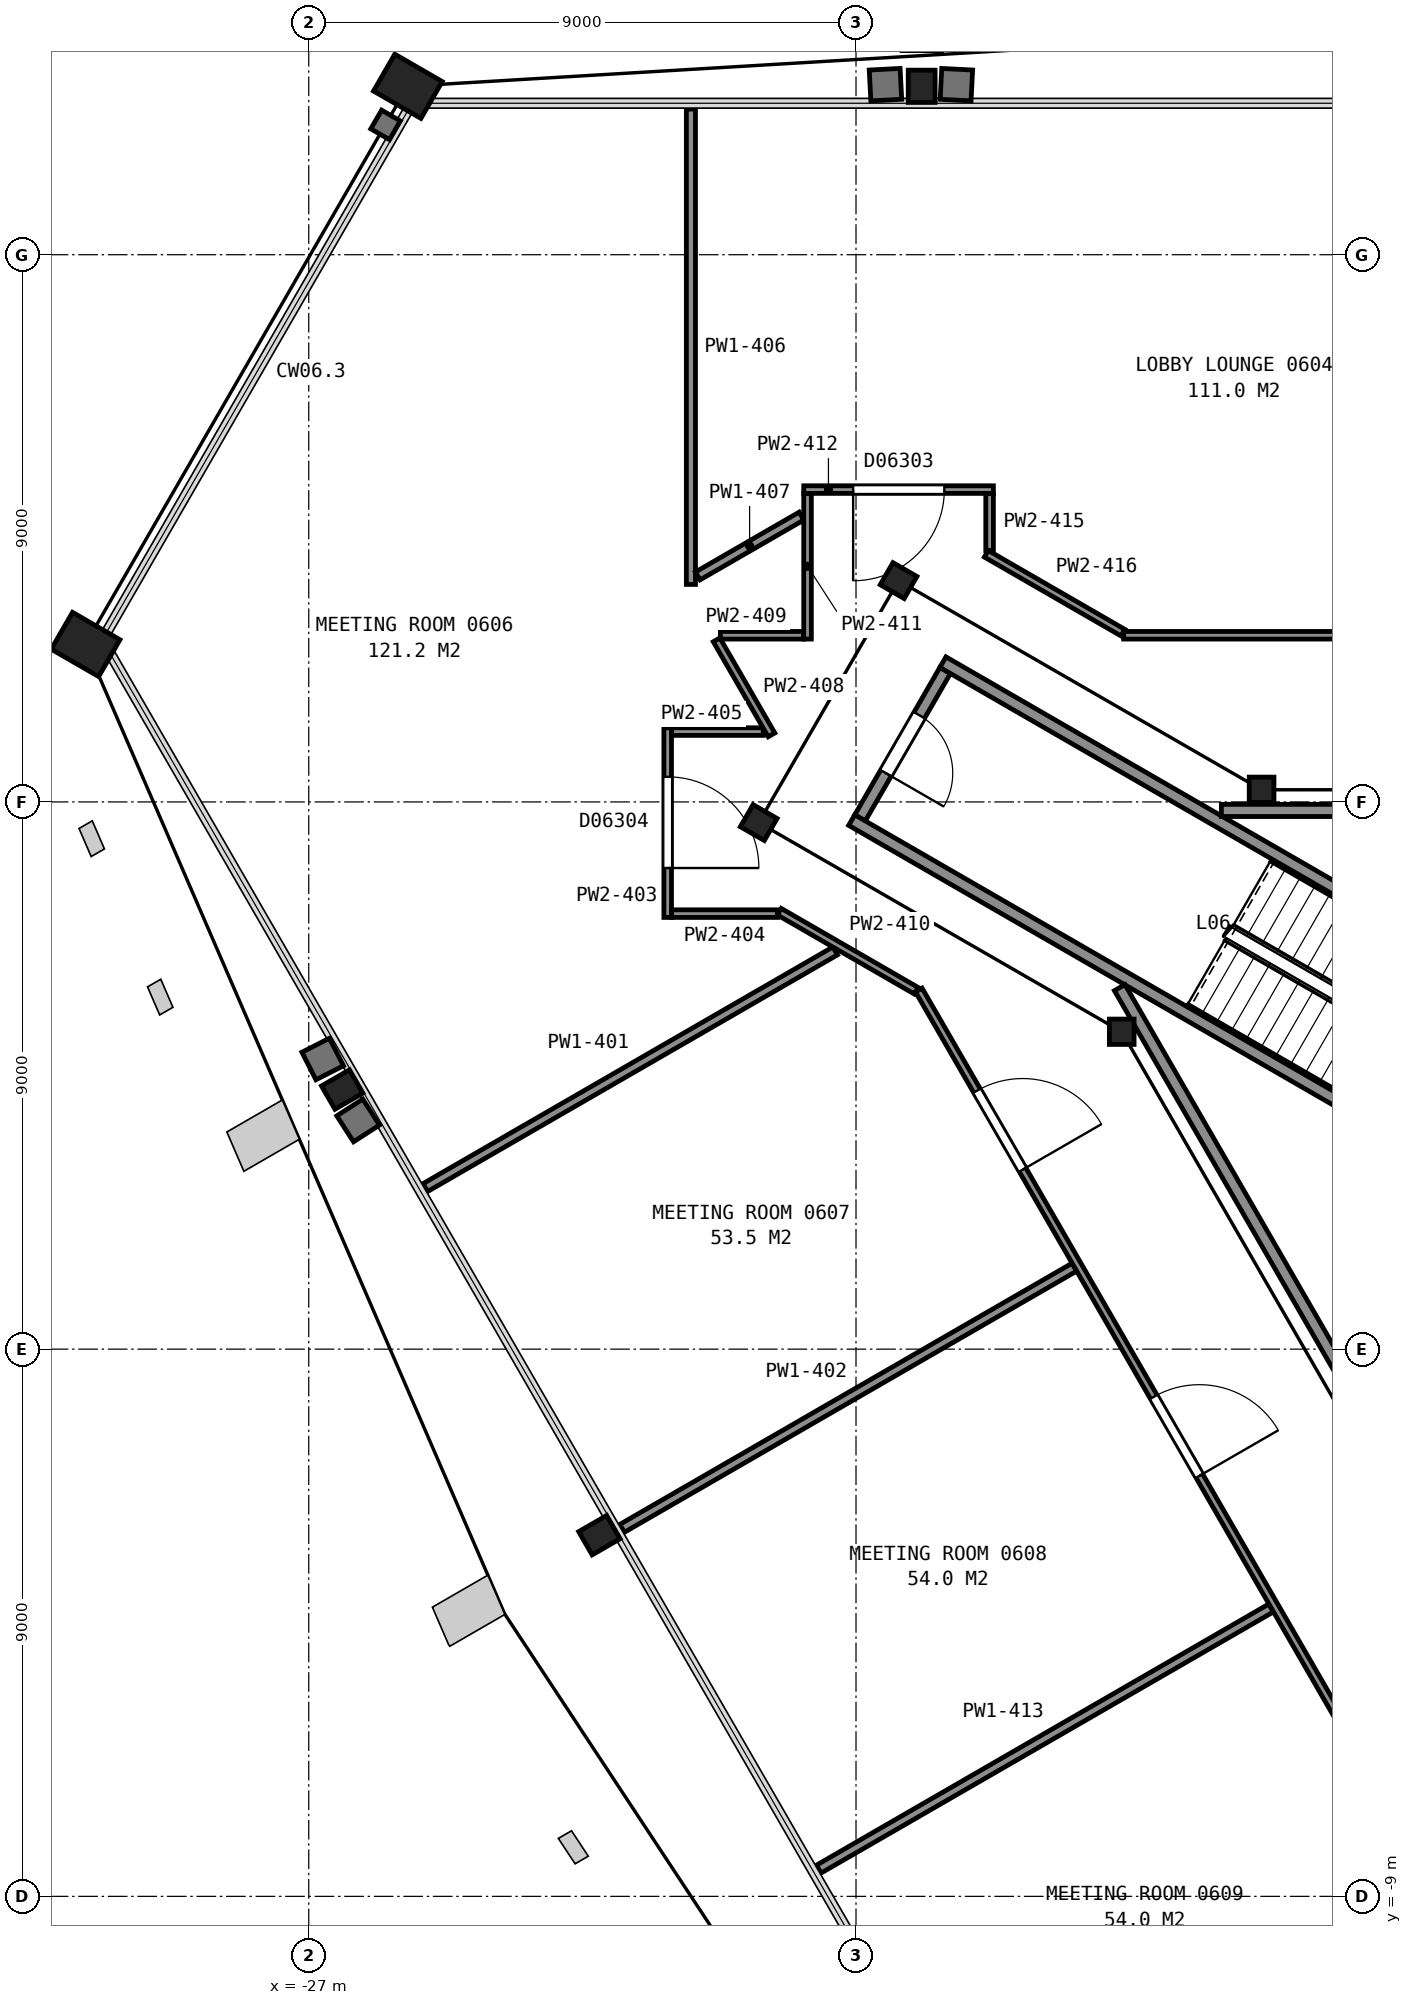
"""IFC4 building model, lengths in metres.
Left out: names, types, materials, properties, quantities, classifications, styles, units other than length and angle.
Written with IfcOpenShell. Run it as: python <this file> out.ifc"""

import sys

from ifc_helpers import new_model, si_unit, direction, frame, frame_2d, origin, origin_2d, place, context, subcontext, project, spatial, rectangle, hollow_rectangle, i_section, extrude, element, fill, save


model = new_model("IFC4")
c1 = context("Model", 3, precision=1e-05, world=origin(), true_north=direction((0.0, 1.0)))
c2 = subcontext(c1, "Body", "Model", "MODEL_VIEW")
j1 = project(units=[si_unit("LENGTHUNIT", "METRE"), si_unit("PLANEANGLEUNIT", "RADIAN")], contexts=[c1])
p1 = place(None, origin())
s1 = spatial("IfcSite", under=j1, at=p1, CompositionType="ELEMENT")
p2 = place(p1, origin())
s2 = spatial("IfcBuilding", under=s1, at=p2, CompositionType="ELEMENT")
p3 = place(p2, frame((0.0, 0.0, 36.8)))
s3 = spatial("IfcBuildingStorey", under=s2, at=p3, CompositionType="ELEMENT", Elevation=36.8)
p4 = place(p3, frame((-16.92, 20.77, 0.03), z_axis=(0.0, 0.0, 1.0), x_axis=(1.0, 0.0, 0.0)))
e1 = element("IfcColumn", 1, at=p4, inside=s3, PredefinedType="COLUMN", context=c2, shape_type="SweptSolid", body=[
    extrude(i_section(OverallWidth=0.442, OverallDepth=0.531, WebThickness=0.066, FlangeThickness=0.106, FilletRadius=0.015, at=origin_2d()), origin(), (0.0, 0.0, 1.0), 3.57),
])
for number, where, z_axis, x_axis in (
    (2, (-25.37, 20.77, 0.045), (0.0, 0.0, 1.0), (0.5, 0.866, 0.0)),
    (3, (-30.67, 11.59, 0.045), (0.0, 0.0, 1.0), (0.5, 0.866, 0.0)),
):
    element("IfcColumn", number, at=place(p3, frame(where, z_axis=z_axis, x_axis=x_axis)), inside=s3, PredefinedType="COLUMN", context=c2, shape_type="SweptSolid", body=[
        extrude(hollow_rectangle(XDim=0.7, YDim=0.9, WallThickness=0.065, at=origin_2d()), origin(), (0.0, 0.0, 1.0), 3.555),
    ])
p5 = place(p3, frame((-26.45, 4.27, 0.03), z_axis=(0.0, 0.0, 1.0), x_axis=(-0.5, 0.866025403784, 0.0)))
e4 = element("IfcColumn", 4, at=p5, inside=s3, PredefinedType="COLUMN", context=c2, shape_type="SweptSolid", body=[
    extrude(i_section(OverallWidth=0.442, OverallDepth=0.531, WebThickness=0.066, FlangeThickness=0.106, FilletRadius=0.015, at=origin_2d()), origin(), (0.0, 0.0, 1.0), 3.57),
])
p6 = place(p3, frame((-22.22, -3.06, 0.025), z_axis=(0.0, 0.0, 1.0), x_axis=(-0.5, 0.866025403784, 0.0)))
e5 = element("IfcColumn", 5, at=p6, inside=s3, PredefinedType="COLUMN", context=c2, shape_type="SweptSolid", body=[
    extrude(i_section(OverallWidth=0.442, OverallDepth=0.531, WebThickness=0.066, FlangeThickness=0.106, FilletRadius=0.015, at=origin_2d()), origin(), (0.0, 0.0, 1.0), 3.575),
])
p7 = place(p3, frame((-11.33, 9.2, 0.0), z_axis=(0.0, 0.0, 1.0), x_axis=(1.0, 0.0, 0.0)))
e6 = element("IfcColumn", 6, at=p7, inside=s3, PredefinedType="COLUMN", context=c2, shape_type="SweptSolid", body=[
    extrude(i_section(OverallWidth=0.406, OverallDepth=0.417, WebThickness=0.03, FlangeThickness=0.048, FilletRadius=0.015, at=origin_2d()), origin(), (0.0, 0.0, 1.0), 3.6),
])
for number, where, z_axis, x_axis in (
    (7, (-17.3, 12.64, 0.0), (0.0, 0.0, 1.0), (0.5, 0.866, 0.0)),
    (8, (-19.6, 8.66, 0.0), (0.0, 0.0, 1.0), (0.5, 0.866, 0.0)),
):
    element("IfcColumn", number, at=place(p3, frame(where, z_axis=z_axis, x_axis=x_axis)), inside=s3, PredefinedType="COLUMN", context=c2, shape_type="SweptSolid", body=[
        extrude(i_section(OverallWidth=0.419, OverallDepth=0.455, WebThickness=0.042, FlangeThickness=0.068, FilletRadius=0.015, at=origin_2d()), origin(), (0.0, 0.0, 1.0), 3.6),
    ])
p8 = place(p3, frame((-13.63, 5.22, 0.0), z_axis=(0.0, 0.0, 1.0), x_axis=(1.0, 0.0, 0.0)))
e9 = element("IfcColumn", 9, at=p8, inside=s3, PredefinedType="COLUMN", context=c2, shape_type="SweptSolid", body=[
    extrude(i_section(OverallWidth=0.406, OverallDepth=0.417, WebThickness=0.03, FlangeThickness=0.048, FilletRadius=0.015, at=origin_2d()), origin(), (0.0, 0.0, 1.0), 3.6),
])
p9 = place(p3, frame((-16.534, 11.162, 0.0), z_axis=(0.0, 0.0, 1.0), x_axis=(-0.49998411664, -0.866034573852, 0.0)))
e10 = element("IfcWall", 10, at=p9, inside=s3, PredefinedType="PARTITIONING", context=c2, shape_type="SweptSolid", body=[
    extrude(rectangle(XDim=2.8, YDim=0.2, at=frame_2d((1.4, 0.0))), origin(), (0.0, 0.0, 1.0), 3.35),
])
p10 = place(p9, frame((0.85, 0.0, 0.0)))
e11 = element("IfcOpeningElement", 11, at=p10, cuts=e10, PredefinedType="OPENING", context=c2, shape_type="SweptSolid", body=[
    extrude(rectangle(XDim=1.1, YDim=2.1, at=frame_2d((0.55, 1.05))), frame((0.0, 0.11, 0.0), z_axis=(0.0, -1.0, 0.0), x_axis=(1.0, 0.0, 0.0)), (0.0, 0.0, 1.0), 0.22),
])
for number, where, z_axis, x_axis in (
    (12, (-7.678, 2.701, 0.0), (0.0, 0.0, 1.0), (-0.866, 0.5, 0.0)),
    (13, (-6.178, 5.299, 0.0), (0.0, 0.0, 1.0), (-0.866, 0.5, 0.0)),
):
    element("IfcWall", number, at=place(p3, frame(where, z_axis=z_axis, x_axis=x_axis)), inside=s3, PredefinedType="PARTITIONING", context=c2, shape_type="SweptSolid", body=[
        extrude(rectangle(XDim=12.0, YDim=0.2, at=frame_2d((6.0, 0.0))), origin(), (0.0, 0.0, 1.0), 3.35),
    ])
p11 = place(p3, frame((-13.664, 5.946, 0.0), z_axis=(0.0, 0.0, 1.0), x_axis=(0.499994327219, -0.866028678941, 0.0)))
e14 = element("IfcWall", 14, at=p11, inside=s3, PredefinedType="PARTITIONING", context=c2, shape_type="SweptSolid", body=[
    extrude(rectangle(XDim=23.968, YDim=0.2, at=frame_2d((11.984, 0.0))), origin(), (0.0, 0.0, 1.0), 3.35),
])
p12 = place(p3, frame((0.263, 8.86, 0.0), z_axis=(0.0, 0.0, 1.0), x_axis=(-1.0, 0.0, 0.0)))
e15 = element("IfcWall", 15, at=p12, inside=s3, PredefinedType="PARTITIONING", context=c2, shape_type="SweptSolid", body=[
    extrude(rectangle(XDim=12.254, YDim=0.2, at=frame_2d((6.127, 0.0))), origin(), (0.0, 0.0, 1.0), 3.35),
])
p13 = place(p12, frame((5.709, 0.0, 0.0)))
e16 = element("IfcOpeningElement", 16, at=p13, cuts=e15, PredefinedType="OPENING", context=c2, shape_type="SweptSolid", body=[
    extrude(rectangle(XDim=1.8, YDim=2.1, at=frame_2d((0.9, 1.05))), frame((0.0, 0.11, 0.0), z_axis=(0.0, -1.0, 0.0), x_axis=(1.0, 0.0, 0.0)), (0.0, 0.0, 1.0), 0.22),
])
p14 = place(p3, frame((-25.084, 2.657, 0.0), z_axis=(0.0, 0.0, 1.0), x_axis=(0.866001204974, 0.500041911227, 0.0)))
e17 = element("IfcWall", 17, at=p14, inside=s3, PredefinedType="PARTITIONING", context=c2, shape_type="SweptSolid", body=[
    extrude(rectangle(XDim=7.784, YDim=0.15, at=frame_2d((3.892, 0.0))), origin(), (0.0, 0.0, 1.0), 2.613),
])
p15 = place(p3, frame((-21.848, -2.948, 0.0), z_axis=(0.0, 0.0, 1.0), x_axis=(0.865958884393, 0.500115197271, 0.0)))
e18 = element("IfcWall", 18, at=p15, inside=s3, PredefinedType="PARTITIONING", context=c2, shape_type="SweptSolid", body=[
    extrude(rectangle(XDim=8.591, YDim=0.15, at=frame_2d((4.296, 0.0))), origin(), (0.0, 0.0, 1.0), 2.613),
])
p16 = place(p3, frame((-21.097, 7.101, 0.0), z_axis=(0.0, 0.0, 1.0), x_axis=(0.0, 1.0, 0.0)))
e19 = element("IfcWall", 19, at=p16, inside=s3, PredefinedType="PARTITIONING", context=c2, shape_type="SweptSolid", body=[
    extrude(rectangle(XDim=3.119, YDim=0.125, at=frame_2d((1.56, 0.0))), origin(), (0.0, 0.0, 1.0), 2.613),
])
p17 = place(p16, frame((0.812, 0.0, 0.0)))
e20 = element("IfcOpeningElement", 20, at=p17, cuts=e19, PredefinedType="OPENING", context=c2, shape_type="SweptSolid", body=[
    extrude(rectangle(XDim=1.5, YDim=2.1, at=frame_2d((0.75, 1.05))), frame((0.0, 0.073, 0.0), z_axis=(0.0, -1.0, 0.0), x_axis=(1.0, 0.0, 0.0)), (0.0, 0.0, 1.0), 0.145),
])
p18 = place(p3, frame((-21.032, 7.163, 0.0), z_axis=(0.0, 0.0, 1.0), x_axis=(1.0, 0.0, 0.0)))
e21 = element("IfcWall", 21, at=p18, inside=s3, PredefinedType="PARTITIONING", context=c2, shape_type="SweptSolid", body=[
    extrude(rectangle(XDim=1.741, YDim=0.125, at=frame_2d((0.871, 0.0))), origin(), (0.0, 0.0, 1.0), 2.613),
])
p19 = place(p3, frame((-21.032, 10.157, 0.0), z_axis=(0.0, 0.0, 1.0), x_axis=(1.0, 0.0, 0.0)))
e22 = element("IfcWall", 22, at=p19, inside=s3, PredefinedType="PARTITIONING", context=c2, shape_type="SweptSolid", body=[
    extrude(rectangle(XDim=1.506, YDim=0.125, at=frame_2d((0.753, 0.0))), origin(), (0.0, 0.0, 1.0), 2.613),
])
p20 = place(p3, frame((-20.715, 12.577, 0.0), z_axis=(0.0, 0.0, 1.0), x_axis=(0.0, 1.0, 0.0)))
e23 = element("IfcWall", 23, at=p20, inside=s3, PredefinedType="PARTITIONING", context=c2, shape_type="SweptSolid", body=[
    extrude(rectangle(XDim=7.818, YDim=0.15, at=frame_2d((3.909, 0.0))), origin(), (0.0, 0.0, 1.0), 2.613),
])
p21 = place(p3, frame((-20.602, 12.717, 0.0), z_axis=(0.0, 0.0, 1.0), x_axis=(0.866121584746, 0.499833372672, 0.0)))
e24 = element("IfcWall", 24, at=p21, inside=s3, PredefinedType="PARTITIONING", context=c2, shape_type="SweptSolid", body=[
    extrude(rectangle(XDim=1.969, YDim=0.15, at=frame_2d((0.984, 0.0))), origin(), (0.0, 0.0, 1.0), 2.613),
])
p22 = place(p3, frame((-20.293, 11.666, 0.0), z_axis=(0.0, 0.0, 1.0), x_axis=(0.500327160669, -0.865836435071, 0.0)))
e25 = element("IfcWall", 25, at=p22, inside=s3, PredefinedType="PARTITIONING", context=c2, shape_type="SweptSolid", body=[
    extrude(rectangle(XDim=1.805, YDim=0.125, at=frame_2d((0.903, 0.0))), origin(), (0.0, 0.0, 1.0), 2.613),
])
p23 = place(p3, frame((-20.23, 11.741, 0.0), z_axis=(0.0, 0.0, 1.0), x_axis=(1.0, 0.0, 0.0)))
e26 = element("IfcWall", 26, at=p23, inside=s3, PredefinedType="PARTITIONING", context=c2, shape_type="SweptSolid", body=[
    extrude(rectangle(XDim=1.368, YDim=0.125, at=frame_2d((0.684, 0.0))), origin(), (0.0, 0.0, 1.0), 2.613),
])
p24 = place(p3, frame((-19.26, 7.194, 0.0), z_axis=(0.0, 0.0, 1.0), x_axis=(0.865944638795, -0.50013986298, 0.0)))
e27 = element("IfcWall", 27, at=p24, inside=s3, PredefinedType="PARTITIONING", context=c2, shape_type="SweptSolid", body=[
    extrude(rectangle(XDim=2.599, YDim=0.125, at=frame_2d((1.299, 0.0))), origin(), (0.0, 0.0, 1.0), 2.613),
])
p25 = place(p3, frame((-18.797, 11.678, 0.0), z_axis=(0.0, 0.0, 1.0), x_axis=(0.0, 1.0, 0.0)))
e28 = element("IfcWall", 28, at=p25, inside=s3, PredefinedType="PARTITIONING", context=c2, shape_type="SweptSolid", body=[
    extrude(rectangle(XDim=2.394, YDim=0.125, at=frame_2d((1.197, 0.0))), origin(), (0.0, 0.0, 1.0), 2.613),
])
p26 = place(p3, frame((-18.86, 14.137, 0.0), z_axis=(0.0, 0.0, 1.0), x_axis=(1.0, 0.0, 0.0)))
e29 = element("IfcWall", 29, at=p26, inside=s3, PredefinedType="PARTITIONING", context=c2, shape_type="SweptSolid", body=[
    extrude(rectangle(XDim=3.119, YDim=0.125, at=frame_2d((1.56, 0.0))), origin(), (0.0, 0.0, 1.0), 2.613),
])
p27 = place(p26, frame((0.812, 0.0, 0.0)))
e30 = element("IfcOpeningElement", 30, at=p27, cuts=e29, PredefinedType="OPENING", context=c2, shape_type="SweptSolid", body=[
    extrude(rectangle(XDim=1.5, YDim=2.1, at=frame_2d((0.75, 1.05))), frame((0.0, 0.073, 0.0), z_axis=(0.0, -1.0, 0.0), x_axis=(1.0, 0.0, 0.0)), (0.0, 0.0, 1.0), 0.145),
])
p28 = place(p3, frame((-18.612, -8.552, 0.0), z_axis=(0.0, 0.0, 1.0), x_axis=(0.866034625887, 0.499984026509, 0.0)))
e31 = element("IfcWall", 31, at=p28, inside=s3, PredefinedType="PARTITIONING", context=c2, shape_type="SweptSolid", body=[
    extrude(rectangle(XDim=8.591, YDim=0.15, at=frame_2d((4.295, 0.0))), origin(), (0.0, 0.0, 1.0), 2.613),
])
p29 = place(p3, frame((-3.766, -16.958, 0.0), z_axis=(0.0, 0.0, 1.0), x_axis=(-0.500024758804, 0.866011108811, 0.0)))
e32 = element("IfcWall", 32, at=p29, inside=s3, PredefinedType="PARTITIONING", context=c2, shape_type="SweptSolid", body=[
    extrude(rectangle(XDim=26.402, YDim=0.125, at=frame_2d((13.201, 0.0))), origin(), (0.0, 0.0, 1.0), 2.613),
])
p30 = place(p29, frame((22.989, 0.0, 0.0)))
e33 = element("IfcOpeningElement", 33, at=p30, cuts=e32, PredefinedType="OPENING", context=c2, shape_type="SweptSolid", body=[
    extrude(rectangle(XDim=1.5, YDim=2.1, at=frame_2d((0.75, 1.05))), frame((0.0, 0.073, 0.0), z_axis=(0.0, -1.0, 0.0), x_axis=(1.0, 0.0, 0.0)), (0.0, 0.0, 1.0), 0.145),
])
p31 = place(p29, frame((17.175, 0.0, 0.0)))
e34 = element("IfcOpeningElement", 34, at=p31, cuts=e32, PredefinedType="OPENING", context=c2, shape_type="SweptSolid", body=[
    extrude(rectangle(XDim=1.5, YDim=2.1, at=frame_2d((0.75, 1.05))), frame((0.0, 0.073, 0.0), z_axis=(0.0, -1.0, 0.0), x_axis=(1.0, 0.0, 0.0)), (0.0, 0.0, 1.0), 0.145),
])
p32 = place(p29, frame((10.703, 0.0, 0.0)))
e35 = element("IfcOpeningElement", 35, at=p32, cuts=e32, PredefinedType="OPENING", context=c2, shape_type="SweptSolid", body=[
    extrude(rectangle(XDim=1.5, YDim=2.1, at=frame_2d((0.75, 1.05))), frame((0.0, 0.073, 0.0), z_axis=(0.0, -1.0, 0.0), x_axis=(1.0, 0.0, 0.0)), (0.0, 0.0, 1.0), 0.145),
])
p33 = place(p29, frame((4.231, 0.0, 0.0)))
e36 = element("IfcOpeningElement", 36, at=p33, cuts=e32, PredefinedType="OPENING", context=c2, shape_type="SweptSolid", body=[
    extrude(rectangle(XDim=1.5, YDim=2.1, at=frame_2d((0.75, 1.05))), frame((0.0, 0.073, 0.0), z_axis=(0.0, -1.0, 0.0), x_axis=(1.0, 0.0, 0.0)), (0.0, 0.0, 1.0), 0.145),
])
p34 = place(p3, frame((-15.803, 13.135, 0.0), z_axis=(0.0, 0.0, 1.0), x_axis=(0.0, 1.0, 0.0)))
e37 = element("IfcWall", 37, at=p34, inside=s3, PredefinedType="PARTITIONING", context=c2, shape_type="SweptSolid", body=[
    extrude(rectangle(XDim=0.937, YDim=0.125, at=frame_2d((0.469, 0.0))), origin(), (0.0, 0.0, 1.0), 2.613),
])
p35 = place(p3, frame((-15.857, 13.081, 0.0), z_axis=(0.0, 0.0, 1.0), x_axis=(0.865988195383, -0.500064441305, 0.0)))
e38 = element("IfcWall", 38, at=p35, inside=s3, PredefinedType="PARTITIONING", context=c2, shape_type="SweptSolid", body=[
    extrude(rectangle(XDim=2.595, YDim=0.125, at=frame_2d((1.298, 0.0))), origin(), (0.0, 0.0, 1.0), 2.613),
])
p36 = place(p3, frame((-13.598, 11.741, 0.0), z_axis=(0.0, 0.0, 1.0), x_axis=(1.0, 0.0, 0.0)))
e39 = element("IfcWall", 39, at=p36, inside=s3, PredefinedType="PARTITIONING", context=c2, shape_type="SweptSolid", body=[
    extrude(rectangle(XDim=27.197, YDim=0.125, at=frame_2d((13.598, 0.0))), origin(), (0.0, 0.0, 1.0), 2.613),
])
p37 = place(p36, frame((13.884, 0.0, 0.0)))
e40 = element("IfcOpeningElement", 40, at=p37, cuts=e39, PredefinedType="OPENING", context=c2, shape_type="SweptSolid", body=[
    extrude(rectangle(XDim=1.5, YDim=2.1, at=frame_2d((0.75, 1.05))), frame((0.0, 0.073, 0.0), z_axis=(0.0, -1.0, 0.0), x_axis=(1.0, 0.0, 0.0)), (0.0, 0.0, 1.0), 0.145),
])
p38 = place(p10, origin())
e41 = element("IfcDoor", 41, at=p38, inside=s3, OperationType="SINGLE_SWING_RIGHT", PredefinedType="DOOR", context=c2, shape_type="SweptSolid", body=[
    extrude(rectangle(XDim=1.1, YDim=2.1, at=frame_2d((0.55, 1.05))), frame((0.0, 0.025, 0.0), z_axis=(0.0, -1.0, 0.0), x_axis=(1.0, 0.0, 0.0)), (0.0, 0.0, 1.0), 0.05),
])
fill(e11, e41)
p39 = place(p17, origin())
e42 = element("IfcDoor", 42, at=p39, inside=s3, OperationType="DOUBLE_DOOR_SINGLE_SWING", PredefinedType="DOOR", context=c2, shape_type="SweptSolid", body=[
    extrude(rectangle(XDim=1.5, YDim=2.1, at=frame_2d((0.75, 1.05))), frame((0.0, 0.025, 0.0), z_axis=(0.0, -1.0, 0.0), x_axis=(1.0, 0.0, 0.0)), (0.0, 0.0, 1.0), 0.05),
])
fill(e20, e42)
p40 = place(p27, origin())
e43 = element("IfcDoor", 43, at=p40, inside=s3, OperationType="DOUBLE_DOOR_SINGLE_SWING", PredefinedType="DOOR", context=c2, shape_type="SweptSolid", body=[
    extrude(rectangle(XDim=1.5, YDim=2.1, at=frame_2d((0.75, 1.05))), frame((0.0, 0.025, 0.0), z_axis=(0.0, -1.0, 0.0), x_axis=(1.0, 0.0, 0.0)), (0.0, 0.0, 1.0), 0.05),
])
fill(e30, e43)
p41 = place(p30, origin())
e44 = element("IfcDoor", 44, at=p41, inside=s3, OperationType="DOUBLE_DOOR_SINGLE_SWING", PredefinedType="DOOR", context=c2, shape_type="SweptSolid", body=[
    extrude(rectangle(XDim=1.5, YDim=2.1, at=frame_2d((0.75, 1.05))), frame((0.0, 0.025, 0.0), z_axis=(0.0, -1.0, 0.0), x_axis=(1.0, 0.0, 0.0)), (0.0, 0.0, 1.0), 0.05),
])
fill(e33, e44)
p42 = place(p31, origin())
e45 = element("IfcDoor", 45, at=p42, inside=s3, OperationType="DOUBLE_DOOR_SINGLE_SWING", PredefinedType="DOOR", context=c2, shape_type="SweptSolid", body=[
    extrude(rectangle(XDim=1.5, YDim=2.1, at=frame_2d((0.75, 1.05))), frame((0.0, 0.025, 0.0), z_axis=(0.0, -1.0, 0.0), x_axis=(1.0, 0.0, 0.0)), (0.0, 0.0, 1.0), 0.05),
])
fill(e34, e45)
save(model, sys.argv[1])
